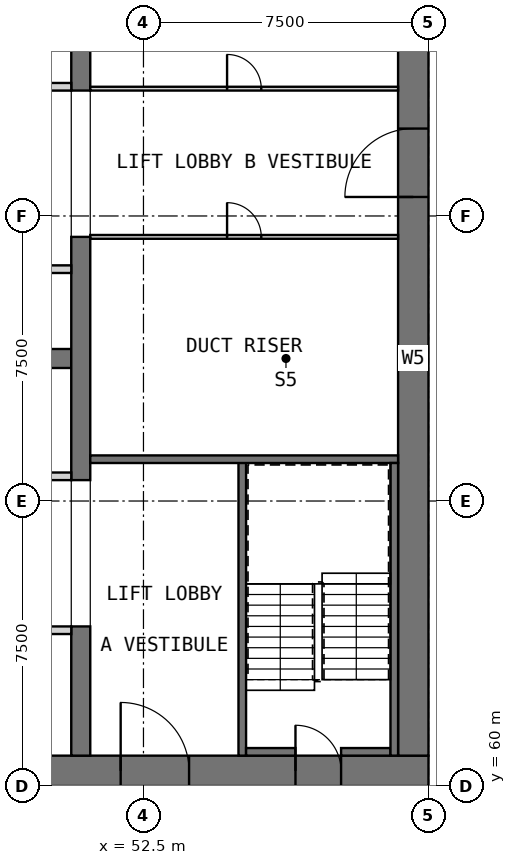
"""IFC4 building model, lengths in metres.
Left out: names, types, materials, properties, quantities, classifications, styles, units other than length and angle.
Written with IfcOpenShell. Run it as: python <this file> out.ifc"""

import sys

from ifc_helpers import new_model, si_unit, direction, frame, frame_2d, origin, place, context, subcontext, project, spatial, rectangle, extrude, element, fill, save


model = new_model("IFC4")
c1 = context("Model", 3, precision=1e-05, world=origin(), true_north=direction((0.0, 1.0)))
c2 = subcontext(c1, "Body", "Model", "MODEL_VIEW")
j1 = project(units=[si_unit("LENGTHUNIT", "METRE"), si_unit("PLANEANGLEUNIT", "RADIAN")], contexts=[c1])
p1 = place(None, origin())
s1 = spatial("IfcSite", under=j1, at=p1, CompositionType="ELEMENT")
p2 = place(p1, origin())
s2 = spatial("IfcBuilding", under=s1, at=p2, CompositionType="ELEMENT")
p3 = place(p2, frame((0.0, 0.0, 210.7)))
s3 = spatial("IfcBuildingStorey", under=s2, at=p3, CompositionType="ELEMENT", Elevation=210.7)
p4 = place(p3, frame((30.0, 60.4, 0.0), z_axis=(0.0, 0.0, 1.0), x_axis=(1.0, 0.0, 0.0)))
e1 = element("IfcWall", 1, at=p4, inside=s3, PredefinedType="SHEAR", context=c2, shape_type="SweptSolid", body=[
    extrude(rectangle(XDim=30.0, YDim=0.8, at=frame_2d((15.0, 0.0))), origin(), (0.0, 0.0, 1.0), 3.5),
])
p5 = place(p4, frame((21.9, 0.0, 0.0)))
e2 = element("IfcOpeningElement", 2, at=p5, cuts=e1, PredefinedType="OPENING", context=c2, shape_type="SweptSolid", body=[
    extrude(rectangle(XDim=1.8, YDim=2.1, at=frame_2d((0.9, 1.05))), frame((0.0, 0.41, 0.0), z_axis=(0.0, -1.0, 0.0), x_axis=(1.0, 0.0, 0.0)), (0.0, 0.0, 1.0), 0.82),
])
p6 = place(p4, frame((26.5, 0.0, 0.0)))
e3 = element("IfcOpeningElement", 3, at=p6, cuts=e1, PredefinedType="OPENING", context=c2, shape_type="SweptSolid", body=[
    extrude(rectangle(XDim=1.2, YDim=2.1, at=frame_2d((0.6, 1.05))), frame((0.0, 0.41, 0.0), z_axis=(0.0, -1.0, 0.0), x_axis=(1.0, 0.0, 0.0)), (0.0, 0.0, 1.0), 0.82),
])
p7 = place(p3, frame((59.6, 60.8, 0.0), z_axis=(0.0, 0.0, 1.0), x_axis=(0.0, 1.0, 0.0)))
e4 = element("IfcWall", 4, at=p7, inside=s3, PredefinedType="SHEAR", context=c2, shape_type="SweptSolid", body=[
    extrude(rectangle(XDim=20.9, YDim=0.8, at=frame_2d((10.45, 0.0))), origin(), (0.0, 0.0, 1.0), 3.5),
])
p8 = place(p7, frame((14.7, 0.0, 0.0)))
e5 = element("IfcOpeningElement", 5, at=p8, cuts=e4, PredefinedType="OPENING", context=c2, shape_type="SweptSolid", body=[
    extrude(rectangle(XDim=1.8, YDim=2.1, at=frame_2d((0.9, 1.05))), frame((0.0, 0.41, 0.0), z_axis=(0.0, -1.0, 0.0), x_axis=(1.0, 0.0, 0.0)), (0.0, 0.0, 1.0), 0.82),
])
p9 = place(p3, frame((35.0, 71.25, 0.0), z_axis=(0.0, 0.0, 1.0), x_axis=(1.0, 0.0, 0.0)))
e6 = element("IfcWall", 6, at=p9, inside=s3, PredefinedType="SHEAR", context=c2, shape_type="SweptSolid", body=[
    extrude(rectangle(XDim=15.6, YDim=0.5, at=frame_2d((7.8, 0.0))), origin(), (0.0, 0.0, 1.0), 3.5),
])
p10 = place(p3, frame((50.85, 60.8, 0.0), z_axis=(0.0, 0.0, 1.0), x_axis=(0.0, 1.0, 0.0)))
e7 = element("IfcWall", 7, at=p10, inside=s3, PredefinedType="SHEAR", context=c2, shape_type="SweptSolid", body=[
    extrude(rectangle(XDim=3.4, YDim=0.5, at=frame_2d((1.7, 0.0))), origin(), (0.0, 0.0, 1.0), 3.5),
])
p11 = place(p3, frame((50.85, 68.05, 0.0), z_axis=(0.0, 0.0, 1.0), x_axis=(0.0, 1.0, 0.0)))
e8 = element("IfcWall", 8, at=p11, inside=s3, PredefinedType="SHEAR", context=c2, shape_type="SweptSolid", body=[
    extrude(rectangle(XDim=6.4, YDim=0.5, at=frame_2d((3.2, 0.0))), origin(), (0.0, 0.0, 1.0), 3.5),
])
p12 = place(p3, frame((50.85, 78.3, 0.0), z_axis=(0.0, 0.0, 1.0), x_axis=(0.0, 1.0, 0.0)))
e9 = element("IfcWall", 9, at=p12, inside=s3, PredefinedType="SHEAR", context=c2, shape_type="SweptSolid", body=[
    extrude(rectangle(XDim=3.4, YDim=0.5, at=frame_2d((1.7, 0.0))), origin(), (0.0, 0.0, 1.0), 3.5),
])
p13 = place(p3, frame((35.0, 64.1, 0.0), z_axis=(0.0, 0.0, 1.0), x_axis=(1.0, 0.0, 0.0)))
e10 = element("IfcWall", 10, at=p13, inside=s3, PredefinedType="PARTITIONING", context=c2, shape_type="SweptSolid", body=[
    extrude(rectangle(XDim=15.6, YDim=0.2, at=frame_2d((7.8, 0.0))), origin(), (0.0, 0.0, 1.0), 3.09),
])
p14 = place(p13, frame((7.35, 0.0, 0.0)))
e11 = element("IfcOpeningElement", 11, at=p14, cuts=e10, PredefinedType="OPENING", context=c2, shape_type="SweptSolid", body=[
    extrude(rectangle(XDim=0.9, YDim=2.1, at=frame_2d((0.45, 1.05))), frame((0.0, 0.11, 0.0), z_axis=(0.0, -1.0, 0.0), x_axis=(1.0, 0.0, 0.0)), (0.0, 0.0, 1.0), 0.22),
])
p15 = place(p3, frame((35.0, 68.15, 0.0), z_axis=(0.0, 0.0, 1.0), x_axis=(1.0, 0.0, 0.0)))
e12 = element("IfcWall", 12, at=p15, inside=s3, PredefinedType="PARTITIONING", context=c2, shape_type="SweptSolid", body=[
    extrude(rectangle(XDim=15.6, YDim=0.2, at=frame_2d((7.8, 0.0))), origin(), (0.0, 0.0, 1.0), 3.09),
])
p16 = place(p15, frame((2.15, 0.0, 0.0)))
e13 = element("IfcOpeningElement", 13, at=p16, cuts=e12, PredefinedType="OPENING", context=c2, shape_type="SweptSolid", body=[
    extrude(rectangle(XDim=0.9, YDim=2.1, at=frame_2d((0.45, 1.05))), frame((0.0, 0.11, 0.0), z_axis=(0.0, -1.0, 0.0), x_axis=(1.0, 0.0, 0.0)), (0.0, 0.0, 1.0), 0.22),
])
p17 = place(p15, frame((7.35, 0.0, 0.0)))
e14 = element("IfcOpeningElement", 14, at=p17, cuts=e12, PredefinedType="OPENING", context=c2, shape_type="SweptSolid", body=[
    extrude(rectangle(XDim=0.9, YDim=2.1, at=frame_2d((0.45, 1.05))), frame((0.0, 0.11, 0.0), z_axis=(0.0, -1.0, 0.0), x_axis=(1.0, 0.0, 0.0)), (0.0, 0.0, 1.0), 0.22),
])
p18 = place(p15, frame((12.55, 0.0, 0.0)))
e15 = element("IfcOpeningElement", 15, at=p18, cuts=e12, PredefinedType="OPENING", context=c2, shape_type="SweptSolid", body=[
    extrude(rectangle(XDim=0.9, YDim=2.1, at=frame_2d((0.45, 1.05))), frame((0.0, 0.11, 0.0), z_axis=(0.0, -1.0, 0.0), x_axis=(1.0, 0.0, 0.0)), (0.0, 0.0, 1.0), 0.22),
])
p19 = place(p3, frame((35.0, 73.6, 0.0), z_axis=(0.0, 0.0, 1.0), x_axis=(1.0, 0.0, 0.0)))
e16 = element("IfcWall", 16, at=p19, inside=s3, PredefinedType="SOLIDWALL", context=c2, shape_type="SweptSolid", body=[
    extrude(rectangle(XDim=15.6, YDim=0.2, at=frame_2d((7.8, 0.0))), origin(), (0.0, 0.0, 1.0), 3.5),
])
p20 = place(p19, frame((0.75, 0.0, 0.0)))
e17 = element("IfcOpeningElement", 17, at=p20, cuts=e16, PredefinedType="OPENING", context=c2, shape_type="SweptSolid", body=[
    extrude(rectangle(XDim=1.1, YDim=2.1, at=frame_2d((0.55, 1.05))), frame((0.0, 0.11, 0.0), z_axis=(0.0, -1.0, 0.0), x_axis=(1.0, 0.0, 0.0)), (0.0, 0.0, 1.0), 0.22),
])
p21 = place(p19, frame((3.35, 0.0, 0.0)))
e18 = element("IfcOpeningElement", 18, at=p21, cuts=e16, PredefinedType="OPENING", context=c2, shape_type="SweptSolid", body=[
    extrude(rectangle(XDim=1.1, YDim=2.1, at=frame_2d((0.55, 1.05))), frame((0.0, 0.11, 0.0), z_axis=(0.0, -1.0, 0.0), x_axis=(1.0, 0.0, 0.0)), (0.0, 0.0, 1.0), 0.22),
])
p22 = place(p19, frame((5.95, 0.0, 0.0)))
e19 = element("IfcOpeningElement", 19, at=p22, cuts=e16, PredefinedType="OPENING", context=c2, shape_type="SweptSolid", body=[
    extrude(rectangle(XDim=1.1, YDim=2.1, at=frame_2d((0.55, 1.05))), frame((0.0, 0.11, 0.0), z_axis=(0.0, -1.0, 0.0), x_axis=(1.0, 0.0, 0.0)), (0.0, 0.0, 1.0), 0.22),
])
p23 = place(p19, frame((8.55, 0.0, 0.0)))
e20 = element("IfcOpeningElement", 20, at=p23, cuts=e16, PredefinedType="OPENING", context=c2, shape_type="SweptSolid", body=[
    extrude(rectangle(XDim=1.1, YDim=2.1, at=frame_2d((0.55, 1.05))), frame((0.0, 0.11, 0.0), z_axis=(0.0, -1.0, 0.0), x_axis=(1.0, 0.0, 0.0)), (0.0, 0.0, 1.0), 0.22),
])
p24 = place(p19, frame((11.15, 0.0, 0.0)))
e21 = element("IfcOpeningElement", 21, at=p24, cuts=e16, PredefinedType="OPENING", context=c2, shape_type="SweptSolid", body=[
    extrude(rectangle(XDim=1.1, YDim=2.1, at=frame_2d((0.55, 1.05))), frame((0.0, 0.11, 0.0), z_axis=(0.0, -1.0, 0.0), x_axis=(1.0, 0.0, 0.0)), (0.0, 0.0, 1.0), 0.22),
])
p25 = place(p19, frame((13.75, 0.0, 0.0)))
e22 = element("IfcOpeningElement", 22, at=p25, cuts=e16, PredefinedType="OPENING", context=c2, shape_type="SweptSolid", body=[
    extrude(rectangle(XDim=1.1, YDim=2.1, at=frame_2d((0.55, 1.05))), frame((0.0, 0.11, 0.0), z_axis=(0.0, -1.0, 0.0), x_axis=(1.0, 0.0, 0.0)), (0.0, 0.0, 1.0), 0.22),
])
p26 = place(p3, frame((35.0, 78.4, 0.0), z_axis=(0.0, 0.0, 1.0), x_axis=(1.0, 0.0, 0.0)))
e23 = element("IfcWall", 23, at=p26, inside=s3, PredefinedType="SOLIDWALL", context=c2, shape_type="SweptSolid", body=[
    extrude(rectangle(XDim=15.6, YDim=0.2, at=frame_2d((7.8, 0.0))), origin(), (0.0, 0.0, 1.0), 3.5),
])
p27 = place(p26, frame((0.75, 0.0, 0.0)))
e24 = element("IfcOpeningElement", 24, at=p27, cuts=e23, PredefinedType="OPENING", context=c2, shape_type="SweptSolid", body=[
    extrude(rectangle(XDim=1.1, YDim=2.1, at=frame_2d((0.55, 1.05))), frame((0.0, 0.11, 0.0), z_axis=(0.0, -1.0, 0.0), x_axis=(1.0, 0.0, 0.0)), (0.0, 0.0, 1.0), 0.22),
])
p28 = place(p26, frame((3.35, 0.0, 0.0)))
e25 = element("IfcOpeningElement", 25, at=p28, cuts=e23, PredefinedType="OPENING", context=c2, shape_type="SweptSolid", body=[
    extrude(rectangle(XDim=1.1, YDim=2.1, at=frame_2d((0.55, 1.05))), frame((0.0, 0.11, 0.0), z_axis=(0.0, -1.0, 0.0), x_axis=(1.0, 0.0, 0.0)), (0.0, 0.0, 1.0), 0.22),
])
p29 = place(p26, frame((11.15, 0.0, 0.0)))
e26 = element("IfcOpeningElement", 26, at=p29, cuts=e23, PredefinedType="OPENING", context=c2, shape_type="SweptSolid", body=[
    extrude(rectangle(XDim=1.1, YDim=2.1, at=frame_2d((0.55, 1.05))), frame((0.0, 0.11, 0.0), z_axis=(0.0, -1.0, 0.0), x_axis=(1.0, 0.0, 0.0)), (0.0, 0.0, 1.0), 0.22),
])
p30 = place(p26, frame((13.75, 0.0, 0.0)))
e27 = element("IfcOpeningElement", 27, at=p30, cuts=e23, PredefinedType="OPENING", context=c2, shape_type="SweptSolid", body=[
    extrude(rectangle(XDim=1.1, YDim=2.1, at=frame_2d((0.55, 1.05))), frame((0.0, 0.11, 0.0), z_axis=(0.0, -1.0, 0.0), x_axis=(1.0, 0.0, 0.0)), (0.0, 0.0, 1.0), 0.22),
])
p31 = place(p3, frame((55.1, 60.8, 0.0), z_axis=(0.0, 0.0, 1.0), x_axis=(0.0, 1.0, 0.0)))
e28 = element("IfcWall", 28, at=p31, inside=s3, PredefinedType="SOLIDWALL", context=c2, shape_type="SweptSolid", body=[
    extrude(rectangle(XDim=7.8, YDim=0.2, at=frame_2d((3.9, 0.0))), origin(), (0.0, 0.0, 1.0), 3.09),
])
p32 = place(p3, frame((51.1, 68.6, 0.0), z_axis=(0.0, 0.0, 1.0), x_axis=(1.0, 0.0, 0.0)))
e29 = element("IfcWall", 29, at=p32, inside=s3, PredefinedType="SOLIDWALL", context=c2, shape_type="SweptSolid", body=[
    extrude(rectangle(XDim=8.1, YDim=0.2, at=frame_2d((4.05, 0.0))), origin(), (0.0, 0.0, 1.0), 3.09),
])
for number, where, z_axis, x_axis in (
    (30, (55.2, 60.9, 0.0), (0.0, 0.0, 1.0), (1.0, 0.0, 0.0)),
    (31, (57.7, 60.9, 0.0), (0.0, 0.0, 1.0), (1.0, 0.0, 0.0)),
):
    element("IfcWall", number, at=place(p3, frame(where, z_axis=z_axis, x_axis=x_axis)), inside=s3, PredefinedType="SOLIDWALL", context=c2, shape_type="SweptSolid", body=[
        extrude(rectangle(XDim=1.3, YDim=0.2, at=frame_2d((0.65, 0.0))), origin(), (0.0, 0.0, 1.0), 3.09),
    ])
p33 = place(p3, frame((59.1, 60.8, 0.0), z_axis=(0.0, 0.0, 1.0), x_axis=(0.0, 1.0, 0.0)))
e32 = element("IfcWall", 32, at=p33, inside=s3, PredefinedType="SOLIDWALL", context=c2, shape_type="SweptSolid", body=[
    extrude(rectangle(XDim=7.7, YDim=0.2, at=frame_2d((3.85, 0.0))), origin(), (0.0, 0.0, 1.0), 3.09),
])
p34 = place(p3, frame((51.1, 74.45, 0.0), z_axis=(0.0, 0.0, 1.0), x_axis=(1.0, 0.0, 0.0)))
e33 = element("IfcWall", 33, at=p34, inside=s3, PredefinedType="PARTITIONING", context=c2, shape_type="SweptSolid", body=[
    extrude(rectangle(XDim=8.1, YDim=0.1, at=frame_2d((4.05, 0.0))), origin(), (0.0, 0.0, 1.0), 3.09),
])
p35 = place(p34, frame((3.6, 0.0, 0.0)))
e34 = element("IfcOpeningElement", 34, at=p35, cuts=e33, PredefinedType="OPENING", context=c2, shape_type="SweptSolid", body=[
    extrude(rectangle(XDim=0.9, YDim=2.1, at=frame_2d((0.45, 1.05))), frame((0.0, 0.06, 0.0), z_axis=(0.0, -1.0, 0.0), x_axis=(1.0, 0.0, 0.0)), (0.0, 0.0, 1.0), 0.12),
])
p36 = place(p3, frame((51.1, 78.35, 0.0), z_axis=(0.0, 0.0, 1.0), x_axis=(1.0, 0.0, 0.0)))
e35 = element("IfcWall", 35, at=p36, inside=s3, PredefinedType="PARTITIONING", context=c2, shape_type="SweptSolid", body=[
    extrude(rectangle(XDim=8.1, YDim=0.1, at=frame_2d((4.05, 0.0))), origin(), (0.0, 0.0, 1.0), 3.09),
])
p37 = place(p36, frame((3.6, 0.0, 0.0)))
e36 = element("IfcOpeningElement", 36, at=p37, cuts=e35, PredefinedType="OPENING", context=c2, shape_type="SweptSolid", body=[
    extrude(rectangle(XDim=0.9, YDim=2.1, at=frame_2d((0.45, 1.05))), frame((0.0, 0.06, 0.0), z_axis=(0.0, -1.0, 0.0), x_axis=(1.0, 0.0, 0.0)), (0.0, 0.0, 1.0), 0.12),
])
p38 = place(p5, origin())
e37 = element("IfcDoor", 37, at=p38, inside=s3, OperationType="DOUBLE_DOOR_SINGLE_SWING", PredefinedType="DOOR", context=c2, shape_type="SweptSolid", body=[
    extrude(rectangle(XDim=1.8, YDim=2.1, at=frame_2d((0.9, 1.05))), frame((0.0, 0.025, 0.0), z_axis=(0.0, -1.0, 0.0), x_axis=(1.0, 0.0, 0.0)), (0.0, 0.0, 1.0), 0.05),
])
fill(e2, e37)
p39 = place(p8, origin())
e38 = element("IfcDoor", 38, at=p39, inside=s3, OperationType="DOUBLE_DOOR_SINGLE_SWING", PredefinedType="DOOR", context=c2, shape_type="SweptSolid", body=[
    extrude(rectangle(XDim=1.8, YDim=2.1, at=frame_2d((0.9, 1.05))), frame((0.0, 0.025, 0.0), z_axis=(0.0, -1.0, 0.0), x_axis=(1.0, 0.0, 0.0)), (0.0, 0.0, 1.0), 0.05),
])
fill(e5, e38)
p40 = place(p6, origin())
e39 = element("IfcDoor", 39, at=p40, inside=s3, OperationType="SINGLE_SWING_LEFT", PredefinedType="DOOR", context=c2, shape_type="SweptSolid", body=[
    extrude(rectangle(XDim=1.2, YDim=2.1, at=frame_2d((0.6, 1.05))), frame((0.0, 0.025, 0.0), z_axis=(0.0, -1.0, 0.0), x_axis=(1.0, 0.0, 0.0)), (0.0, 0.0, 1.0), 0.05),
])
fill(e3, e39)
p41 = place(p35, origin())
e40 = element("IfcDoor", 40, at=p41, inside=s3, OperationType="SINGLE_SWING_RIGHT", PredefinedType="DOOR", context=c2, shape_type="SweptSolid", body=[
    extrude(rectangle(XDim=0.9, YDim=2.1, at=frame_2d((0.45, 1.05))), frame((0.0, 0.025, 0.0), z_axis=(0.0, -1.0, 0.0), x_axis=(1.0, 0.0, 0.0)), (0.0, 0.0, 1.0), 0.05),
])
fill(e34, e40)
p42 = place(p37, origin())
e41 = element("IfcDoor", 41, at=p42, inside=s3, OperationType="SINGLE_SWING_RIGHT", PredefinedType="DOOR", context=c2, shape_type="SweptSolid", body=[
    extrude(rectangle(XDim=0.9, YDim=2.1, at=frame_2d((0.45, 1.05))), frame((0.0, 0.025, 0.0), z_axis=(0.0, -1.0, 0.0), x_axis=(1.0, 0.0, 0.0)), (0.0, 0.0, 1.0), 0.05),
])
fill(e36, e41)
save(model, sys.argv[1])
